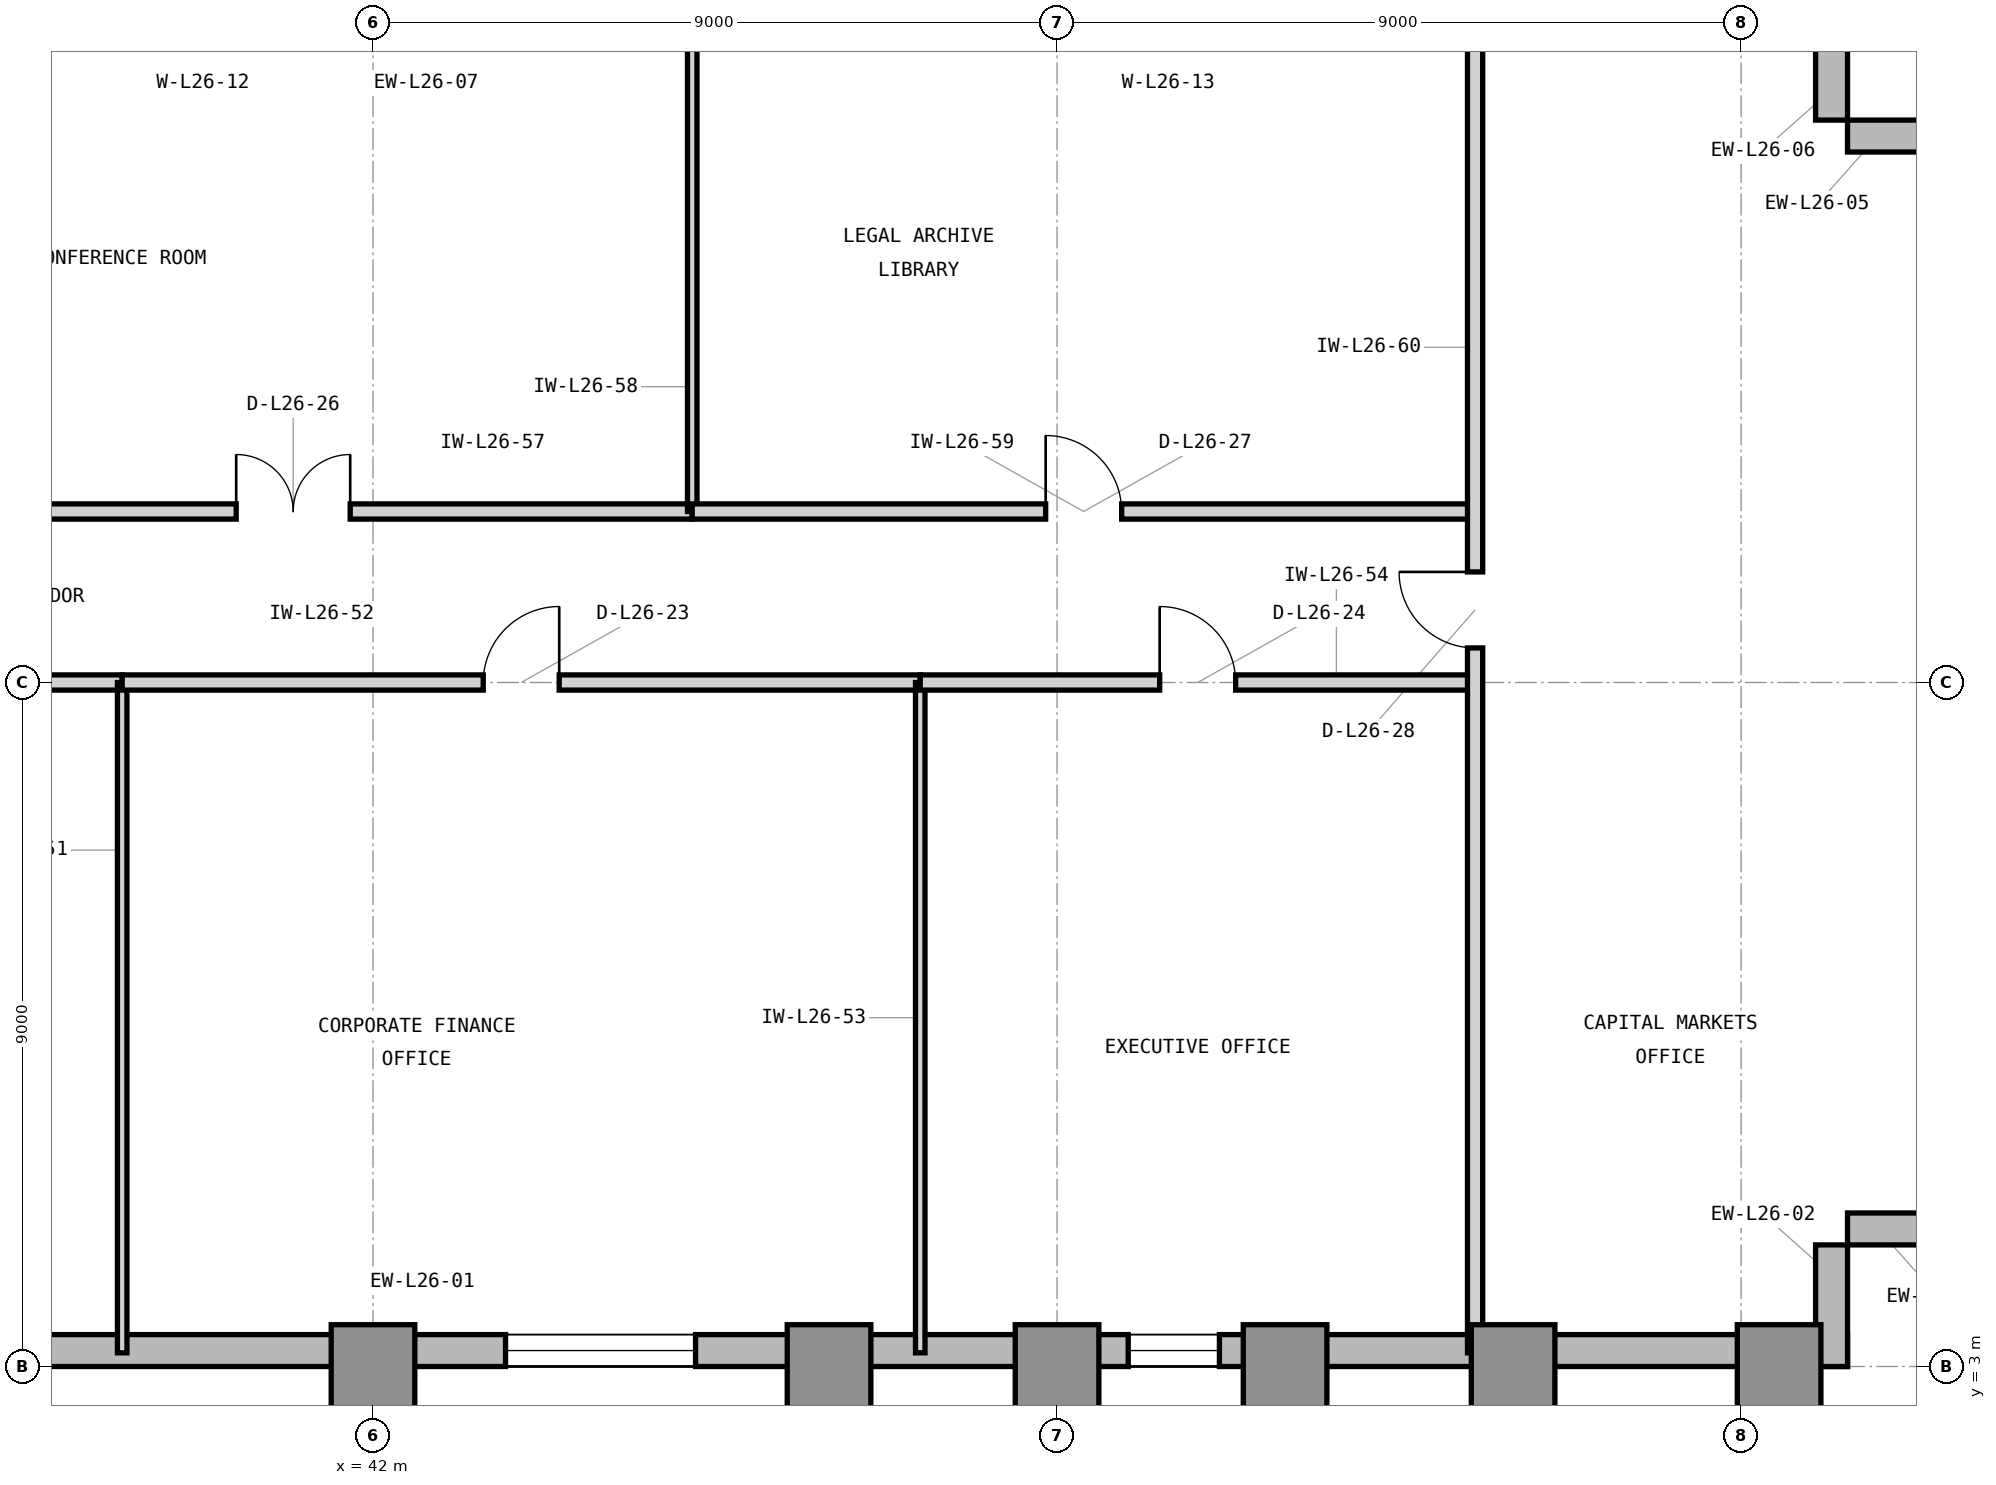
"""IFC4 building model, lengths in metres.
Left out: names, types, materials, properties, quantities, classifications, styles, units other than length and angle.
Written with IfcOpenShell. Run it as: python <this file> out.ifc"""

import sys

from ifc_helpers import new_model, si_unit, direction, frame, frame_2d, origin, origin_2d, place, context, subcontext, project, spatial, rectangle, extrude, element, fill, save


model = new_model("IFC4")
c1 = context("Model", 3, precision=1e-05, world=origin(), true_north=direction((0.0, 1.0)))
c2 = subcontext(c1, "Body", "Model", "MODEL_VIEW")
j1 = project(units=[si_unit("LENGTHUNIT", "METRE"), si_unit("PLANEANGLEUNIT", "RADIAN")], contexts=[c1])
p1 = place(None, origin())
s1 = spatial("IfcSite", under=j1, at=p1, CompositionType="ELEMENT")
p2 = place(p1, origin())
s2 = spatial("IfcBuilding", under=s1, at=p2, CompositionType="ELEMENT")
p3 = place(p2, frame((0.0, 0.0, 112.8)))
s3 = spatial("IfcBuildingStorey", under=s2, at=p3, CompositionType="ELEMENT", Elevation=112.8)
for number, where, z_axis, x_axis in (
    (1, (42.0, 3.0, 0.0), (0.0, 0.0, 1.0), (1.0, 0.0, 0.0)),
    (2, (48.0, 3.0, 0.0), (0.0, 0.0, 1.0), (1.0, 0.0, 0.0)),
    (3, (51.0, 3.0, 0.0), (0.0, 0.0, 1.0), (1.0, 0.0, 0.0)),
    (4, (54.0, 3.0, 0.0), (0.0, 0.0, 1.0), (1.0, 0.0, 0.0)),
    (5, (57.0, 3.0, 0.0), (0.0, 0.0, 1.0), (1.0, 0.0, 0.0)),
    (6, (60.5, 3.0, 0.0), (0.0, 0.0, 1.0), (1.0, 0.0, 0.0)),
):
    element("IfcColumn", number, at=place(p3, frame(where, z_axis=z_axis, x_axis=x_axis)), inside=s3, PredefinedType="COLUMN", context=c2, shape_type="SweptSolid", body=[
        extrude(rectangle(XDim=1.1, YDim=1.1, at=origin_2d()), origin(), (0.0, 0.0, 1.0), 3.9),
    ])
p4 = place(p3, frame((23.9, 3.21, 0.0), z_axis=(0.0, 0.0, 1.0), x_axis=(1.0, 0.0, 0.0)))
e7 = element("IfcWall", 7, at=p4, inside=s3, PredefinedType="STANDARD", context=c2, shape_type="SweptSolid", body=[
    extrude(rectangle(XDim=37.5, YDim=0.42, at=frame_2d((18.75, 0.0))), origin(), (0.0, 0.0, 1.0), 3.7),
])
p5 = place(p4, frame((10.469, 0.0, 0.85)))
e8 = element("IfcOpeningElement", 8, at=p5, cuts=e7, PredefinedType="OPENING", context=c2, shape_type="SweptSolid", body=[
    extrude(rectangle(XDim=2.5, YDim=2.25, at=frame_2d((1.25, 1.125))), frame((0.0, 0.22, 0.0), z_axis=(0.0, -1.0, 0.0), x_axis=(1.0, 0.0, 0.0)), (0.0, 0.0, 1.0), 0.44),
])
p6 = place(p4, frame((19.844, 0.0, 0.85)))
e9 = element("IfcOpeningElement", 9, at=p6, cuts=e7, PredefinedType="OPENING", context=c2, shape_type="SweptSolid", body=[
    extrude(rectangle(XDim=2.5, YDim=2.25, at=frame_2d((1.25, 1.125))), frame((0.0, 0.22, 0.0), z_axis=(0.0, -1.0, 0.0), x_axis=(1.0, 0.0, 0.0)), (0.0, 0.0, 1.0), 0.44),
])
p7 = place(p4, frame((1.1, 0.0, 0.85)))
e10 = element("IfcOpeningElement", 10, at=p7, cuts=e7, PredefinedType="OPENING", context=c2, shape_type="SweptSolid", body=[
    extrude(rectangle(XDim=1.2, YDim=2.25, at=frame_2d((0.6, 1.125))), frame((0.0, 0.22, 0.0), z_axis=(0.0, -1.0, 0.0), x_axis=(1.0, 0.0, 0.0)), (0.0, 0.0, 1.0), 0.44),
])
p8 = place(p4, frame((28.036, 0.0, 0.85)))
e11 = element("IfcOpeningElement", 11, at=p8, cuts=e7, PredefinedType="OPENING", context=c2, shape_type="SweptSolid", body=[
    extrude(rectangle(XDim=1.2, YDim=2.25, at=frame_2d((0.6, 1.125))), frame((0.0, 0.22, 0.0), z_axis=(0.0, -1.0, 0.0), x_axis=(1.0, 0.0, 0.0)), (0.0, 0.0, 1.0), 0.44),
])
for number, where, z_axis, x_axis in (
    (12, (61.19, 3.0, 0.0), (0.0, 0.0, 1.0), (0.0, 1.0, 0.0)),
    (13, (61.4, 4.81, 0.0), (0.0, 0.0, 1.0), (1.0, 0.0, 0.0)),
    (14, (63.0, 19.19, 0.0), (0.0, 0.0, 1.0), (-1.0, 0.0, 0.0)),
    (15, (61.19, 19.4, 0.0), (0.0, 0.0, 1.0), (0.0, 1.0, 0.0)),
):
    element("IfcWall", number, at=place(p3, frame(where, z_axis=z_axis, x_axis=x_axis)), inside=s3, PredefinedType="STANDARD", context=c2, shape_type="SweptSolid", body=[
        extrude(rectangle(XDim=1.6, YDim=0.42, at=frame_2d((0.8, 0.0))), origin(), (0.0, 0.0, 1.0), 3.7),
    ])
p9 = place(p3, frame((26.7, 12.0, 0.0), z_axis=(0.0, 0.0, 1.0), x_axis=(1.0, 0.0, 0.0)))
e16 = element("IfcWall", 16, at=p9, inside=s3, PredefinedType="PARTITIONING", context=c2, shape_type="SweptSolid", body=[
    extrude(rectangle(XDim=12.0, YDim=0.2, at=frame_2d((6.0, 0.0))), origin(), (0.0, 0.0, 1.0), 3.227),
])
p10 = place(p9, frame((5.5, 0.0, 0.0)))
e17 = element("IfcOpeningElement", 17, at=p10, cuts=e16, PredefinedType="OPENING", context=c2, shape_type="SweptSolid", body=[
    extrude(rectangle(XDim=1.0, YDim=2.15, at=frame_2d((0.5, 1.075))), frame((0.0, 0.11, 0.0), z_axis=(0.0, -1.0, 0.0), x_axis=(1.0, 0.0, 0.0)), (0.0, 0.0, 1.0), 0.22),
])
p11 = place(p3, frame((38.7, 3.18, 0.0), z_axis=(0.0, 0.0, 1.0), x_axis=(0.0, 1.0, 0.0)))
e18 = element("IfcWall", 18, at=p11, inside=s3, PredefinedType="PARTITIONING", context=c2, shape_type="SweptSolid", body=[
    extrude(rectangle(XDim=8.82, YDim=0.125, at=frame_2d((4.41, 0.0))), origin(), (0.0, 0.0, 1.0), 3.69),
])
p12 = place(p3, frame((38.7, 12.0, 0.0), z_axis=(0.0, 0.0, 1.0), x_axis=(1.0, 0.0, 0.0)))
e19 = element("IfcWall", 19, at=p12, inside=s3, PredefinedType="PARTITIONING", context=c2, shape_type="SweptSolid", body=[
    extrude(rectangle(XDim=10.5, YDim=0.2, at=frame_2d((5.25, 0.0))), origin(), (0.0, 0.0, 1.0), 3.227),
])
p13 = place(p12, frame((4.75, 0.0, 0.0)))
e20 = element("IfcOpeningElement", 20, at=p13, cuts=e19, PredefinedType="OPENING", context=c2, shape_type="SweptSolid", body=[
    extrude(rectangle(XDim=1.0, YDim=2.15, at=frame_2d((0.5, 1.075))), frame((0.0, 0.11, 0.0), z_axis=(0.0, -1.0, 0.0), x_axis=(1.0, 0.0, 0.0)), (0.0, 0.0, 1.0), 0.22),
])
p14 = place(p3, frame((49.2, 3.18, 0.0), z_axis=(0.0, 0.0, 1.0), x_axis=(0.0, 1.0, 0.0)))
e21 = element("IfcWall", 21, at=p14, inside=s3, PredefinedType="PARTITIONING", context=c2, shape_type="SweptSolid", body=[
    extrude(rectangle(XDim=8.82, YDim=0.125, at=frame_2d((4.41, 0.0))), origin(), (0.0, 0.0, 1.0), 3.69),
])
p15 = place(p3, frame((49.2, 12.0, 0.0), z_axis=(0.0, 0.0, 1.0), x_axis=(1.0, 0.0, 0.0)))
e22 = element("IfcWall", 22, at=p15, inside=s3, PredefinedType="PARTITIONING", context=c2, shape_type="SweptSolid", body=[
    extrude(rectangle(XDim=7.3, YDim=0.2, at=frame_2d((3.65, 0.0))), origin(), (0.0, 0.0, 1.0), 3.227),
])
p16 = place(p15, frame((3.15, 0.0, 0.0)))
e23 = element("IfcOpeningElement", 23, at=p16, cuts=e22, PredefinedType="OPENING", context=c2, shape_type="SweptSolid", body=[
    extrude(rectangle(XDim=1.0, YDim=2.15, at=frame_2d((0.5, 1.075))), frame((0.0, 0.11, 0.0), z_axis=(0.0, -1.0, 0.0), x_axis=(1.0, 0.0, 0.0)), (0.0, 0.0, 1.0), 0.22),
])
p17 = place(p3, frame((35.7, 14.25, 0.0), z_axis=(0.0, 0.0, 1.0), x_axis=(1.0, 0.0, 0.0)))
e24 = element("IfcWall", 24, at=p17, inside=s3, PredefinedType="PARTITIONING", context=c2, shape_type="SweptSolid", body=[
    extrude(rectangle(XDim=10.5, YDim=0.2, at=frame_2d((5.25, 0.0))), origin(), (0.0, 0.0, 1.0), 3.69),
])
p18 = place(p17, frame((4.5, 0.0, 0.0)))
e25 = element("IfcOpeningElement", 25, at=p18, cuts=e24, PredefinedType="OPENING", context=c2, shape_type="SweptSolid", body=[
    extrude(rectangle(XDim=1.5, YDim=2.3, at=frame_2d((0.75, 1.15))), frame((0.0, 0.11, 0.0), z_axis=(0.0, -1.0, 0.0), x_axis=(1.0, 0.0, 0.0)), (0.0, 0.0, 1.0), 0.22),
])
p19 = place(p3, frame((46.2, 14.25, 0.0), z_axis=(0.0, 0.0, 1.0), x_axis=(0.0, 1.0, 0.0)))
e26 = element("IfcWall", 26, at=p19, inside=s3, PredefinedType="PARTITIONING", context=c2, shape_type="SweptSolid", body=[
    extrude(rectangle(XDim=6.57, YDim=0.125, at=frame_2d((3.285, 0.0))), origin(), (0.0, 0.0, 1.0), 3.69),
])
p20 = place(p3, frame((46.2, 14.25, 0.0), z_axis=(0.0, 0.0, 1.0), x_axis=(1.0, 0.0, 0.0)))
e27 = element("IfcWall", 27, at=p20, inside=s3, PredefinedType="PARTITIONING", context=c2, shape_type="SweptSolid", body=[
    extrude(rectangle(XDim=10.3, YDim=0.2, at=frame_2d((5.15, 0.0))), origin(), (0.0, 0.0, 1.0), 3.69),
])
p21 = place(p20, frame((4.65, 0.0, 0.0)))
e28 = element("IfcOpeningElement", 28, at=p21, cuts=e27, PredefinedType="OPENING", context=c2, shape_type="SweptSolid", body=[
    extrude(rectangle(XDim=1.0, YDim=2.15, at=frame_2d((0.5, 1.075))), frame((0.0, 0.11, 0.0), z_axis=(0.0, -1.0, 0.0), x_axis=(1.0, 0.0, 0.0)), (0.0, 0.0, 1.0), 0.22),
])
p22 = place(p3, frame((56.5, 3.18, 0.0), z_axis=(0.0, 0.0, 1.0), x_axis=(0.0, 1.0, 0.0)))
e29 = element("IfcWall", 29, at=p22, inside=s3, PredefinedType="PARTITIONING", context=c2, shape_type="SweptSolid", body=[
    extrude(rectangle(XDim=17.64, YDim=0.2, at=frame_2d((8.82, 0.0))), origin(), (0.0, 0.0, 1.0), 3.69),
])
p23 = place(p22, frame((9.275, 0.0, 0.0)))
e30 = element("IfcOpeningElement", 30, at=p23, cuts=e29, PredefinedType="OPENING", context=c2, shape_type="SweptSolid", body=[
    extrude(rectangle(XDim=1.0, YDim=2.15, at=frame_2d((0.5, 1.075))), frame((0.0, 0.11, 0.0), z_axis=(0.0, -1.0, 0.0), x_axis=(1.0, 0.0, 0.0)), (0.0, 0.0, 1.0), 0.22),
])
p24 = place(p6, origin())
e31 = element("IfcWindow", 31, at=p24, inside=s3, PartitioningType="SINGLE_PANEL", PredefinedType="WINDOW", context=c2, shape_type="SweptSolid", body=[
    extrude(rectangle(XDim=2.5, YDim=2.25, at=frame_2d((1.25, 1.125))), frame((0.0, 0.11, 0.0), z_axis=(0.0, -1.0, 0.0), x_axis=(1.0, 0.0, 0.0)), (0.0, 0.0, 1.0), 0.06),
])
fill(e9, e31)
p25 = place(p13, origin())
e32 = element("IfcDoor", 32, at=p25, inside=s3, OperationType="SINGLE_SWING_RIGHT", PredefinedType="DOOR", context=c2, shape_type="SweptSolid", body=[
    extrude(rectangle(XDim=1.0, YDim=2.15, at=frame_2d((0.5, 1.075))), frame((0.0, 0.025, 0.0), z_axis=(0.0, -1.0, 0.0), x_axis=(1.0, 0.0, 0.0)), (0.0, 0.0, 1.0), 0.05),
])
fill(e20, e32)
p26 = place(p16, origin())
e33 = element("IfcDoor", 33, at=p26, inside=s3, OperationType="SINGLE_SWING_LEFT", PredefinedType="DOOR", context=c2, shape_type="SweptSolid", body=[
    extrude(rectangle(XDim=1.0, YDim=2.15, at=frame_2d((0.5, 1.075))), frame((0.0, 0.025, 0.0), z_axis=(0.0, -1.0, 0.0), x_axis=(1.0, 0.0, 0.0)), (0.0, 0.0, 1.0), 0.05),
])
fill(e23, e33)
p27 = place(p18, origin())
e34 = element("IfcDoor", 34, at=p27, inside=s3, OperationType="DOUBLE_DOOR_SINGLE_SWING", PredefinedType="DOOR", context=c2, shape_type="SweptSolid", body=[
    extrude(rectangle(XDim=1.5, YDim=2.3, at=frame_2d((0.75, 1.15))), frame((0.0, 0.025, 0.0), z_axis=(0.0, -1.0, 0.0), x_axis=(1.0, 0.0, 0.0)), (0.0, 0.0, 1.0), 0.05),
])
fill(e25, e34)
p28 = place(p21, origin())
e35 = element("IfcDoor", 35, at=p28, inside=s3, OperationType="SINGLE_SWING_LEFT", PredefinedType="DOOR", context=c2, shape_type="SweptSolid", body=[
    extrude(rectangle(XDim=1.0, YDim=2.15, at=frame_2d((0.5, 1.075))), frame((0.0, 0.025, 0.0), z_axis=(0.0, -1.0, 0.0), x_axis=(1.0, 0.0, 0.0)), (0.0, 0.0, 1.0), 0.05),
])
fill(e28, e35)
p29 = place(p23, origin())
e36 = element("IfcDoor", 36, at=p29, inside=s3, OperationType="SINGLE_SWING_RIGHT", PredefinedType="DOOR", context=c2, shape_type="SweptSolid", body=[
    extrude(rectangle(XDim=1.0, YDim=2.15, at=frame_2d((0.5, 1.075))), frame((0.0, 0.025, 0.0), z_axis=(0.0, -1.0, 0.0), x_axis=(1.0, 0.0, 0.0)), (0.0, 0.0, 1.0), 0.05),
])
fill(e30, e36)
p30 = place(p8, origin())
e37 = element("IfcWindow", 37, at=p30, inside=s3, PartitioningType="SINGLE_PANEL", PredefinedType="WINDOW", context=c2, shape_type="SweptSolid", body=[
    extrude(rectangle(XDim=1.2, YDim=2.25, at=frame_2d((0.6, 1.125))), frame((0.0, 0.11, 0.0), z_axis=(0.0, -1.0, 0.0), x_axis=(1.0, 0.0, 0.0)), (0.0, 0.0, 1.0), 0.06),
])
fill(e11, e37)
save(model, sys.argv[1])
